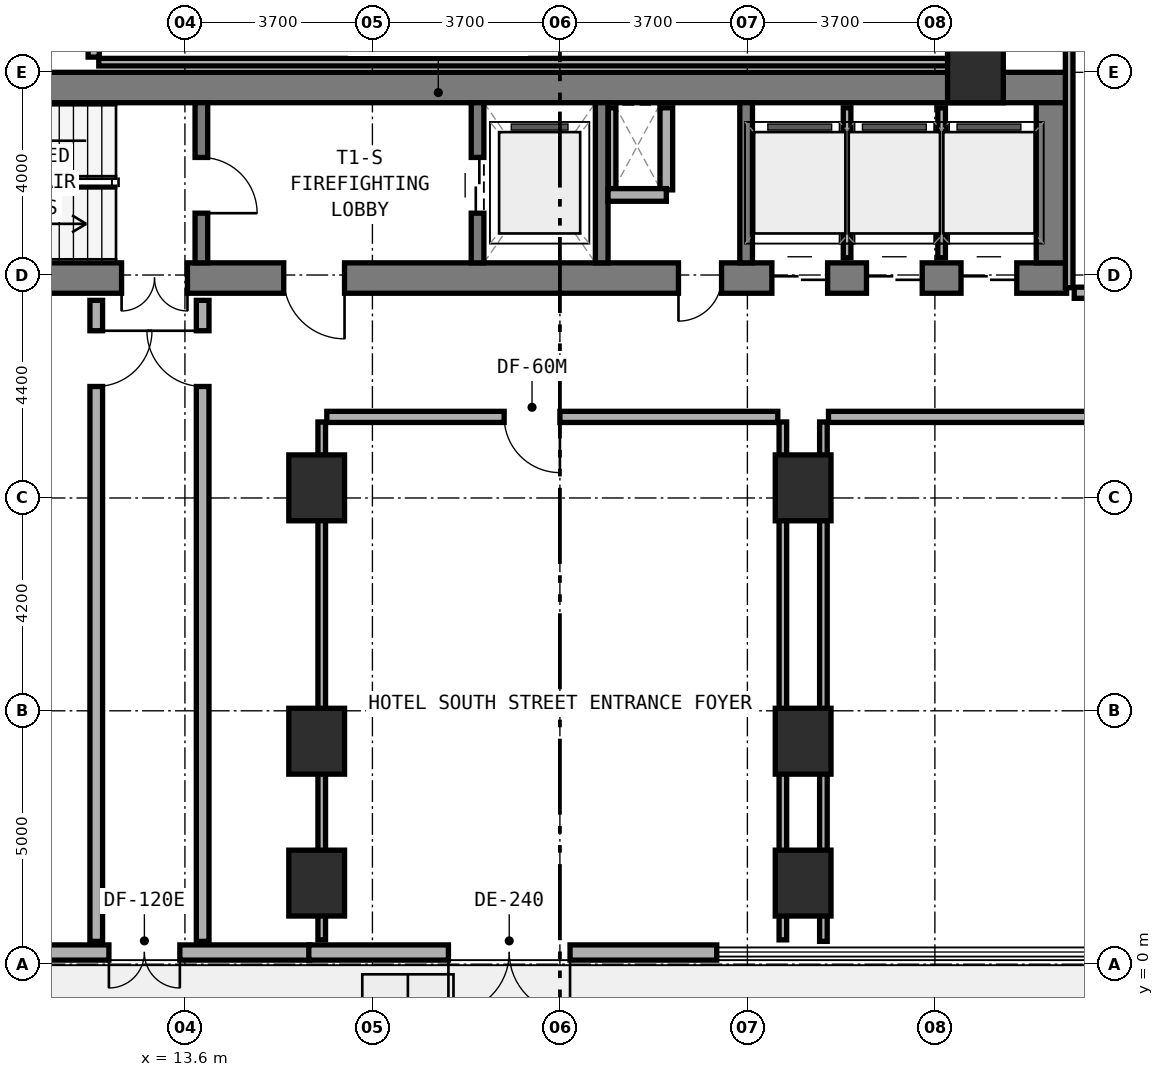
"""IFC4 building model, lengths in metres.
Left out: names, types, materials, properties, quantities, classifications, styles, units other than length and angle.
Written with IfcOpenShell. Run it as: python <this file> out.ifc"""

import sys

from ifc_helpers import new_model, si_unit, direction, frame, frame_2d, origin, origin_2d, place, context, subcontext, project, spatial, rectangle, extrude, element, fill, save


model = new_model("IFC4")
c1 = context("Model", 3, precision=1e-05, world=origin(), true_north=direction((0.0, 1.0)))
c2 = subcontext(c1, "Body", "Model", "MODEL_VIEW")
j1 = project(units=[si_unit("LENGTHUNIT", "METRE"), si_unit("PLANEANGLEUNIT", "RADIAN")], contexts=[c1])
p1 = place(None, origin())
s1 = spatial("IfcSite", under=j1, at=p1, CompositionType="ELEMENT")
p2 = place(p1, origin())
s2 = spatial("IfcBuilding", under=s1, at=p2, CompositionType="ELEMENT")
p3 = place(p2, origin())
s3 = spatial("IfcBuildingStorey", under=s2, at=p3, CompositionType="ELEMENT", Elevation=0.0)
p4 = place(p3, frame((6.2, 13.54, 0.0), z_axis=(0.0, 0.0, 1.0), x_axis=(1.0, 0.0, 0.0)))
e1 = element("IfcWall", 1, at=p4, inside=s3, PredefinedType="SHEAR", context=c2, shape_type="SweptSolid", body=[
    extrude(rectangle(XDim=24.8, YDim=0.6, at=frame_2d((12.4, 0.0))), origin(), (0.0, 0.0, 1.0), 5.4),
])
p5 = place(p4, frame((9.35, 0.0, 0.0)))
e2 = element("IfcOpeningElement", 2, at=p5, cuts=e1, PredefinedType="OPENING", context=c2, shape_type="SweptSolid", body=[
    extrude(rectangle(XDim=1.2, YDim=2.15, at=frame_2d((0.6, 1.075))), frame((0.0, 0.31, 0.0), z_axis=(0.0, -1.0, 0.0), x_axis=(1.0, 0.0, 0.0)), (0.0, 0.0, 1.0), 0.62),
])
p6 = place(p4, frame((6.15, 0.0, 0.0)))
e3 = element("IfcOpeningElement", 3, at=p6, cuts=e1, PredefinedType="OPENING", context=c2, shape_type="SweptSolid", body=[
    extrude(rectangle(XDim=1.3, YDim=2.15, at=frame_2d((0.65, 1.075))), frame((0.0, 0.31, 0.0), z_axis=(0.0, -1.0, 0.0), x_axis=(1.0, 0.0, 0.0)), (0.0, 0.0, 1.0), 0.62),
])
p7 = place(p4, frame((17.14, 0.0, 0.0)))
e4 = element("IfcOpeningElement", 4, at=p7, cuts=e1, PredefinedType="OPENING", context=c2, shape_type="SweptSolid", body=[
    extrude(rectangle(XDim=0.85, YDim=2.1, at=frame_2d((0.425, 1.05))), frame((0.0, 0.31, 0.0), z_axis=(0.0, -1.0, 0.0), x_axis=(1.0, 0.0, 0.0)), (0.0, 0.0, 1.0), 0.62),
])
p8 = place(p4, frame((18.983, 0.0, 0.0)))
e5 = element("IfcOpeningElement", 5, at=p8, cuts=e1, PredefinedType="OPENING", context=c2, shape_type="SweptSolid", body=[
    extrude(rectangle(XDim=1.1, YDim=2.15, at=frame_2d((0.55, 1.075))), frame((0.0, 0.31, 0.0), z_axis=(0.0, -1.0, 0.0), x_axis=(1.0, 0.0, 0.0)), (0.0, 0.0, 1.0), 0.62),
])
p9 = place(p4, frame((20.85, 0.0, 0.0)))
e6 = element("IfcOpeningElement", 6, at=p9, cuts=e1, PredefinedType="OPENING", context=c2, shape_type="SweptSolid", body=[
    extrude(rectangle(XDim=1.1, YDim=2.15, at=frame_2d((0.55, 1.075))), frame((0.0, 0.31, 0.0), z_axis=(0.0, -1.0, 0.0), x_axis=(1.0, 0.0, 0.0)), (0.0, 0.0, 1.0), 0.62),
])
p10 = place(p4, frame((22.716, 0.0, 0.0)))
e7 = element("IfcOpeningElement", 7, at=p10, cuts=e1, PredefinedType="OPENING", context=c2, shape_type="SweptSolid", body=[
    extrude(rectangle(XDim=1.1, YDim=2.15, at=frame_2d((0.55, 1.075))), frame((0.0, 0.31, 0.0), z_axis=(0.0, -1.0, 0.0), x_axis=(1.0, 0.0, 0.0)), (0.0, 0.0, 1.0), 0.62),
])
p11 = place(p3, frame((6.2, 17.3, 0.0), z_axis=(0.0, 0.0, 1.0), x_axis=(1.0, 0.0, 0.0)))
e8 = element("IfcWall", 8, at=p11, inside=s3, PredefinedType="SHEAR", context=c2, shape_type="SweptSolid", body=[
    extrude(rectangle(XDim=24.8, YDim=0.6, at=frame_2d((12.4, 0.0))), origin(), (0.0, 0.0, 1.0), 5.4),
])
p12 = place(p3, frame((30.7, 13.84, 0.0), z_axis=(0.0, 0.0, 1.0), x_axis=(0.0, 1.0, 0.0)))
e9 = element("IfcWall", 9, at=p12, inside=s3, PredefinedType="SHEAR", context=c2, shape_type="SweptSolid", body=[
    extrude(rectangle(XDim=3.16, YDim=0.6, at=frame_2d((1.58, 0.0))), origin(), (0.0, 0.0, 1.0), 5.4),
])
p13 = place(p3, frame((13.925, 13.84, 0.0), z_axis=(0.0, 0.0, 1.0), x_axis=(0.0, 1.0, 0.0)))
e10 = element("IfcWall", 10, at=p13, inside=s3, PredefinedType="STANDARD", context=c2, shape_type="SweptSolid", body=[
    extrude(rectangle(XDim=3.16, YDim=0.25, at=frame_2d((1.58, 0.0))), origin(), (0.0, 0.0, 1.0), 5.05),
])
p14 = place(p13, frame((0.98, 0.0, 0.0)))
e11 = element("IfcOpeningElement", 11, at=p14, cuts=e10, PredefinedType="OPENING", context=c2, shape_type="SweptSolid", body=[
    extrude(rectangle(XDim=1.1, YDim=2.15, at=frame_2d((0.55, 1.075))), frame((0.0, 0.135, 0.0), z_axis=(0.0, -1.0, 0.0), x_axis=(1.0, 0.0, 0.0)), (0.0, 0.0, 1.0), 0.27),
])
p15 = place(p3, frame((19.375, 13.84, 0.0), z_axis=(0.0, 0.0, 1.0), x_axis=(0.0, 1.0, 0.0)))
e12 = element("IfcWall", 12, at=p15, inside=s3, PredefinedType="STANDARD", context=c2, shape_type="SweptSolid", body=[
    extrude(rectangle(XDim=3.16, YDim=0.25, at=frame_2d((1.58, 0.0))), origin(), (0.0, 0.0, 1.0), 5.05),
])
p16 = place(p15, frame((0.98, 0.0, 0.0)))
e13 = element("IfcOpeningElement", 13, at=p16, cuts=e12, PredefinedType="OPENING", context=c2, shape_type="SweptSolid", body=[
    extrude(rectangle(XDim=1.1, YDim=2.15, at=frame_2d((0.55, 1.075))), frame((0.0, 0.135, 0.0), z_axis=(0.0, -1.0, 0.0), x_axis=(1.0, 0.0, 0.0)), (0.0, 0.0, 1.0), 0.27),
])
for number, where, z_axis, x_axis in (
    (14, (21.825, 13.84, 0.0), (0.0, 0.0, 1.0), (0.0, 1.0, 0.0)),
    (15, (24.675, 13.84, 0.0), (0.0, 0.0, 1.0), (0.0, 1.0, 0.0)),
):
    element("IfcWall", number, at=place(p3, frame(where, z_axis=z_axis, x_axis=x_axis)), inside=s3, PredefinedType="STANDARD", context=c2, shape_type="SweptSolid", body=[
        extrude(rectangle(XDim=3.16, YDim=0.25, at=frame_2d((1.58, 0.0))), origin(), (0.0, 0.0, 1.0), 5.05),
    ])
for number, where, z_axis, x_axis in (
    (16, (16.2, 9.4, 0.0), (0.0, 0.0, 1.0), (1.0, 0.0, 0.0)),
    (17, (25.8, 9.4, 0.0), (0.0, 0.0, 1.0), (1.0, 0.0, 0.0)),
    (18, (29.2, 17.65, 0.0), (0.0, 0.0, 1.0), (1.0, 0.0, 0.0)),
    (19, (16.2, 1.6, 0.0), (0.0, 0.0, 1.0), (1.0, 0.0, 0.0)),
    (20, (25.8, 1.6, 0.0), (0.0, 0.0, 1.0), (1.0, 0.0, 0.0)),
    (21, (16.2, 4.4, 0.0), (0.0, 0.0, 1.0), (1.0, 0.0, 0.0)),
    (22, (25.8, 4.4, 0.0), (0.0, 0.0, 1.0), (1.0, 0.0, 0.0)),
):
    element("IfcColumn", number, at=place(p3, frame(where, z_axis=z_axis, x_axis=x_axis)), inside=s3, PredefinedType="COLUMN", context=c2, shape_type="SweptSolid", body=[
        extrude(rectangle(XDim=1.1, YDim=1.3, at=origin_2d()), origin(), (0.0, 0.0, 1.0), 5.4),
    ])
p17 = place(p3, frame((8.059, 0.23, 0.0), z_axis=(0.0, 0.0, 1.0), x_axis=(1.0, 0.0, 0.0)))
e23 = element("IfcWall", 23, at=p17, inside=s3, PredefinedType="STANDARD", context=c2, shape_type="SweptSolid", body=[
    extrude(rectangle(XDim=8.002, YDim=0.3, at=frame_2d((4.001, 0.0))), origin(), (0.0, 0.0, 1.0), 5.05),
])
p18 = place(p17, frame((4.041, 0.0, 0.0)))
e24 = element("IfcOpeningElement", 24, at=p18, cuts=e23, PredefinedType="OPENING", context=c2, shape_type="SweptSolid", body=[
    extrude(rectangle(XDim=1.4, YDim=2.2, at=frame_2d((0.7, 1.1))), frame((0.0, 0.16, 0.0), z_axis=(0.0, -1.0, 0.0), x_axis=(1.0, 0.0, 0.0)), (0.0, 0.0, 1.0), 0.32),
])
p19 = place(p3, frame((16.045, 0.23, 0.0), z_axis=(0.0, 0.0, 1.0), x_axis=(1.0, 0.0, 0.0)))
e25 = element("IfcWall", 25, at=p19, inside=s3, PredefinedType="STANDARD", context=c2, shape_type="SweptSolid", body=[
    extrude(rectangle(XDim=8.05, YDim=0.3, at=frame_2d((4.025, 0.0))), origin(), (0.0, 0.0, 1.0), 5.05),
])
p20 = place(p19, frame((2.755, 0.0, 0.0)))
e26 = element("IfcOpeningElement", 26, at=p20, cuts=e25, PredefinedType="OPENING", context=c2, shape_type="SweptSolid", body=[
    extrude(rectangle(XDim=2.4, YDim=2.6, at=frame_2d((1.2, 1.3))), frame((0.0, 0.16, 0.0), z_axis=(0.0, -1.0, 0.0), x_axis=(1.0, 0.0, 0.0)), (0.0, 0.0, 1.0), 0.32),
])
p21 = place(p3, frame((22.03, 15.28, 0.0), z_axis=(0.0, 0.0, 1.0), x_axis=(0.0, 1.0, 0.0)))
e27 = element("IfcWall", 27, at=p21, inside=s3, PredefinedType="PARTITIONING", context=c2, shape_type="SweptSolid", body=[
    extrude(rectangle(XDim=1.62, YDim=0.15, at=frame_2d((0.81, 0.0))), origin(), (0.0, 0.0, 1.0), 5.05),
])
p22 = place(p3, frame((23.1, 15.28, 0.0), z_axis=(0.0, 0.0, 1.0), x_axis=(0.0, 1.0, 0.0)))
e28 = element("IfcWall", 28, at=p22, inside=s3, PredefinedType="SOLIDWALL", context=c2, shape_type="SweptSolid", body=[
    extrude(rectangle(XDim=1.62, YDim=0.25, at=frame_2d((0.81, 0.0))), origin(), (0.0, 0.0, 1.0), 5.05),
])
p23 = place(p3, frame((21.95, 15.18, 0.0), z_axis=(0.0, 0.0, 1.0), x_axis=(1.0, 0.0, 0.0)))
e29 = element("IfcWall", 29, at=p23, inside=s3, PredefinedType="SOLIDWALL", context=c2, shape_type="SweptSolid", body=[
    extrude(rectangle(XDim=1.15, YDim=0.25, at=frame_2d((0.575, 0.0))), origin(), (0.0, 0.0, 1.0), 5.05),
])
p24 = place(p3, frame((26.667, 13.94, 0.0), z_axis=(0.0, 0.0, 1.0), x_axis=(0.0, 1.0, 0.0)))
e30 = element("IfcWall", 30, at=p24, inside=s3, PredefinedType="PARTITIONING", context=c2, shape_type="SweptSolid", body=[
    extrude(rectangle(XDim=2.96, YDim=0.15, at=frame_2d((1.48, 0.0))), origin(), (0.0, 0.0, 1.0), 5.05),
])
p25 = place(p3, frame((28.533, 13.94, 0.0), z_axis=(0.0, 0.0, 1.0), x_axis=(0.0, 1.0, 0.0)))
e31 = element("IfcWall", 31, at=p25, inside=s3, PredefinedType="PARTITIONING", context=c2, shape_type="SweptSolid", body=[
    extrude(rectangle(XDim=2.96, YDim=0.15, at=frame_2d((1.48, 0.0))), origin(), (0.0, 0.0, 1.0), 4.125),
])
p26 = place(p3, frame((11.85, 0.45, 0.0), z_axis=(0.0, 0.0, 1.0), x_axis=(0.0, 1.0, 0.0)))
e32 = element("IfcWall", 32, at=p26, inside=s3, PredefinedType="SOLIDWALL", context=c2, shape_type="SweptSolid", body=[
    extrude(rectangle(XDim=12.65, YDim=0.25, at=frame_2d((6.325, 0.0))), origin(), (0.0, 0.0, 1.0), 4.225),
])
p27 = place(p26, frame((10.95, 0.0, 0.0)))
e33 = element("IfcOpeningElement", 33, at=p27, cuts=e32, PredefinedType="OPENING", context=c2, shape_type="SweptSolid", body=[
    extrude(rectangle(XDim=1.1, YDim=2.15, at=frame_2d((0.55, 1.075))), frame((0.0, 0.135, 0.0), z_axis=(0.0, -1.0, 0.0), x_axis=(1.0, 0.0, 0.0)), (0.0, 0.0, 1.0), 0.27),
])
p28 = place(p3, frame((13.95, 0.45, 0.0), z_axis=(0.0, 0.0, 1.0), x_axis=(0.0, 1.0, 0.0)))
e34 = element("IfcWall", 34, at=p28, inside=s3, PredefinedType="SOLIDWALL", context=c2, shape_type="SweptSolid", body=[
    extrude(rectangle(XDim=12.65, YDim=0.25, at=frame_2d((6.325, 0.0))), origin(), (0.0, 0.0, 1.0), 4.225),
])
p29 = place(p28, frame((10.95, 0.0, 0.0)))
e35 = element("IfcOpeningElement", 35, at=p29, cuts=e34, PredefinedType="OPENING", context=c2, shape_type="SweptSolid", body=[
    extrude(rectangle(XDim=1.1, YDim=2.15, at=frame_2d((0.55, 1.075))), frame((0.0, 0.135, 0.0), z_axis=(0.0, -1.0, 0.0), x_axis=(1.0, 0.0, 0.0)), (0.0, 0.0, 1.0), 0.27),
])
p30 = place(p3, frame((29.0, 17.9, 0.0), z_axis=(0.0, 0.0, 1.0), x_axis=(0.0, 1.0, 0.0)))
e36 = element("IfcWall", 36, at=p30, inside=s3, PredefinedType="PARTITIONING", context=c2, shape_type="SweptSolid", body=[
    extrude(rectangle(XDim=14.2, YDim=0.15, at=frame_2d((7.1, 0.0))), origin(), (0.0, 0.0, 1.0), 4.025),
])
p31 = place(p3, frame((11.9, 17.8, 0.0), z_axis=(0.0, 0.0, 1.0), x_axis=(1.0, 0.0, 0.0)))
e37 = element("IfcWall", 37, at=p31, inside=s3, PredefinedType="PARTITIONING", context=c2, shape_type="SweptSolid", body=[
    extrude(rectangle(XDim=17.0, YDim=0.15, at=frame_2d((8.5, 0.0))), origin(), (0.0, 0.0, 1.0), 5.05),
])
p32 = place(p3, frame((11.8, 17.9, 0.0), z_axis=(0.0, 0.0, 1.0), x_axis=(0.0, 1.0, 0.0)))
e38 = element("IfcWall", 38, at=p32, inside=s3, PredefinedType="SOLIDWALL", context=c2, shape_type="SweptSolid", body=[
    extrude(rectangle(XDim=14.2, YDim=0.22, at=frame_2d((7.1, 0.0))), origin(), (0.0, 0.0, 1.0), 4.125),
])
p33 = place(p32, frame((5.885, 0.0, 0.0)))
e39 = element("IfcOpeningElement", 39, at=p33, cuts=e38, PredefinedType="OPENING", context=c2, shape_type="SweptSolid", body=[
    extrude(rectangle(XDim=1.1, YDim=2.1, at=frame_2d((0.55, 1.05))), frame((0.0, 0.12, 0.0), z_axis=(0.0, -1.0, 0.0), x_axis=(1.0, 0.0, 0.0)), (0.0, 0.0, 1.0), 0.24),
])
p34 = place(p3, frame((31.05, 13.35, 0.0), z_axis=(0.0, 0.0, 1.0), x_axis=(0.0, 1.0, 0.0)))
e40 = element("IfcWall", 40, at=p34, inside=s3, PredefinedType="PARTITIONING", context=c2, shape_type="SweptSolid", body=[
    extrude(rectangle(XDim=18.75, YDim=0.15, at=frame_2d((9.375, 0.0))), origin(), (0.0, 0.0, 1.0), 4.025),
])
p35 = place(p3, frame((31.15, 13.25, 0.0), z_axis=(0.0, 0.0, 1.0), x_axis=(1.0, 0.0, 0.0)))
e41 = element("IfcWall", 41, at=p35, inside=s3, PredefinedType="SOLIDWALL", context=c2, shape_type="SweptSolid", body=[
    extrude(rectangle(XDim=9.75, YDim=0.22, at=frame_2d((4.875, 0.0))), origin(), (0.0, 0.0, 1.0), 4.575),
])
p36 = place(p35, frame((3.882, 0.0, 0.0)))
e42 = element("IfcOpeningElement", 42, at=p36, cuts=e41, PredefinedType="OPENING", context=c2, shape_type="SweptSolid", body=[
    extrude(rectangle(XDim=1.1, YDim=2.1, at=frame_2d((0.55, 1.05))), frame((0.0, 0.12, 0.0), z_axis=(0.0, -1.0, 0.0), x_axis=(1.0, 0.0, 0.0)), (0.0, 0.0, 1.0), 0.24),
])
for number, where, z_axis, x_axis in (
    (43, (16.3, 0.48, 0.0), (0.0, 0.0, 1.0), (0.0, 1.0, 0.0)),
    (44, (25.4, 0.48, 0.0), (0.0, 0.0, 1.0), (0.0, 1.0, 0.0)),
):
    element("IfcWall", number, at=place(p3, frame(where, z_axis=z_axis, x_axis=x_axis)), inside=s3, PredefinedType="PARTITIONING", context=c2, shape_type="SweptSolid", body=[
        extrude(rectangle(XDim=10.22, YDim=0.15, at=frame_2d((5.11, 0.0))), origin(), (0.0, 0.0, 1.0), 4.425),
    ])
p37 = place(p3, frame((16.4, 10.8, 0.0), z_axis=(0.0, 0.0, 1.0), x_axis=(1.0, 0.0, 0.0)))
e45 = element("IfcWall", 45, at=p37, inside=s3, PredefinedType="SOLIDWALL", context=c2, shape_type="SweptSolid", body=[
    extrude(rectangle(XDim=8.9, YDim=0.22, at=frame_2d((4.45, 0.0))), origin(), (0.0, 0.0, 1.0), 5.05),
])
p38 = place(p37, frame((3.5, 0.0, 0.0)))
e46 = element("IfcOpeningElement", 46, at=p38, cuts=e45, PredefinedType="OPENING", context=c2, shape_type="SweptSolid", body=[
    extrude(rectangle(XDim=1.1, YDim=2.1, at=frame_2d((0.55, 1.05))), frame((0.0, 0.12, 0.0), z_axis=(0.0, -1.0, 0.0), x_axis=(1.0, 0.0, 0.0)), (0.0, 0.0, 1.0), 0.24),
])
p39 = place(p3, frame((26.2, 0.45, 0.0), z_axis=(0.0, 0.0, 1.0), x_axis=(0.0, 1.0, 0.0)))
e47 = element("IfcWall", 47, at=p39, inside=s3, PredefinedType="PARTITIONING", context=c2, shape_type="SweptSolid", body=[
    extrude(rectangle(XDim=10.25, YDim=0.15, at=frame_2d((5.125, 0.0))), origin(), (0.0, 0.0, 1.0), 4.125),
])
p40 = place(p3, frame((26.3, 10.8, 0.0), z_axis=(0.0, 0.0, 1.0), x_axis=(1.0, 0.0, 0.0)))
e48 = element("IfcWall", 48, at=p40, inside=s3, PredefinedType="SOLIDWALL", context=c2, shape_type="SweptSolid", body=[
    extrude(rectangle(XDim=14.8, YDim=0.22, at=frame_2d((7.4, 0.0))), origin(), (0.0, 0.0, 1.0), 4.125),
])
p41 = place(p40, frame((5.875, 0.0, 0.0)))
e49 = element("IfcOpeningElement", 49, at=p41, cuts=e48, PredefinedType="OPENING", context=c2, shape_type="SweptSolid", body=[
    extrude(rectangle(XDim=1.1, YDim=2.1, at=frame_2d((0.55, 1.05))), frame((0.0, 0.12, 0.0), z_axis=(0.0, -1.0, 0.0), x_axis=(1.0, 0.0, 0.0)), (0.0, 0.0, 1.0), 0.24),
])
p42 = place(p18, frame((1.4, 0.0, 0.0), z_axis=(0.0, 0.0, 1.0), x_axis=(-1.0, 0.0, 0.0)))
e50 = element("IfcDoor", 50, at=p42, inside=s3, OperationType="DOUBLE_DOOR_SINGLE_SWING", PredefinedType="DOOR", context=c2, shape_type="SweptSolid", body=[
    extrude(rectangle(XDim=1.4, YDim=2.2, at=frame_2d((0.7, 1.1))), frame((0.0, 0.025, 0.0), z_axis=(0.0, -1.0, 0.0), x_axis=(1.0, 0.0, 0.0)), (0.0, 0.0, 1.0), 0.05),
])
fill(e24, e50)
p43 = place(p20, frame((2.4, 0.0, 0.0), z_axis=(0.0, 0.0, 1.0), x_axis=(-1.0, 0.0, 0.0)))
e51 = element("IfcDoor", 51, at=p43, inside=s3, OperationType="DOUBLE_DOOR_SINGLE_SWING", PredefinedType="DOOR", context=c2, shape_type="SweptSolid", body=[
    extrude(rectangle(XDim=2.4, YDim=2.6, at=frame_2d((1.2, 1.3))), frame((0.0, 0.025, 0.0), z_axis=(0.0, -1.0, 0.0), x_axis=(1.0, 0.0, 0.0)), (0.0, 0.0, 1.0), 0.05),
])
fill(e26, e51)
p44 = place(p14, frame((1.1, 0.0, 0.0), z_axis=(0.0, 0.0, 1.0), x_axis=(-1.0, 0.0, 0.0)))
e52 = element("IfcDoor", 52, at=p44, inside=s3, OperationType="SINGLE_SWING_RIGHT", PredefinedType="DOOR", context=c2, shape_type="SweptSolid", body=[
    extrude(rectangle(XDim=1.1, YDim=2.15, at=frame_2d((0.55, 1.075))), frame((0.0, 0.025, 0.0), z_axis=(0.0, -1.0, 0.0), x_axis=(1.0, 0.0, 0.0)), (0.0, 0.0, 1.0), 0.05),
])
fill(e11, e52)
p45 = place(p5, frame((1.2, 0.0, 0.0), z_axis=(0.0, 0.0, 1.0), x_axis=(-1.0, 0.0, 0.0)))
e53 = element("IfcDoor", 53, at=p45, inside=s3, OperationType="SINGLE_SWING_LEFT", PredefinedType="DOOR", context=c2, shape_type="SweptSolid", body=[
    extrude(rectangle(XDim=1.2, YDim=2.15, at=frame_2d((0.6, 1.075))), frame((0.0, 0.025, 0.0), z_axis=(0.0, -1.0, 0.0), x_axis=(1.0, 0.0, 0.0)), (0.0, 0.0, 1.0), 0.05),
])
fill(e2, e53)
p46 = place(p6, frame((1.3, 0.0, 0.0), z_axis=(0.0, 0.0, 1.0), x_axis=(-1.0, 0.0, 0.0)))
e54 = element("IfcDoor", 54, at=p46, inside=s3, OperationType="DOUBLE_DOOR_SINGLE_SWING", PredefinedType="DOOR", context=c2, shape_type="SweptSolid", body=[
    extrude(rectangle(XDim=1.3, YDim=2.15, at=frame_2d((0.65, 1.075))), frame((0.0, 0.025, 0.0), z_axis=(0.0, -1.0, 0.0), x_axis=(1.0, 0.0, 0.0)), (0.0, 0.0, 1.0), 0.05),
])
fill(e3, e54)
p47 = place(p16, origin())
e55 = element("IfcDoor", 55, at=p47, inside=s3, OperationType="DOUBLE_DOOR_SLIDING", PredefinedType="DOOR", context=c2, shape_type="SweptSolid", body=[
    extrude(rectangle(XDim=1.1, YDim=2.15, at=frame_2d((0.55, 1.075))), frame((0.0, 0.025, 0.0), z_axis=(0.0, -1.0, 0.0), x_axis=(1.0, 0.0, 0.0)), (0.0, 0.0, 1.0), 0.05),
])
fill(e13, e55)
p48 = place(p7, frame((0.85, 0.0, 0.0), z_axis=(0.0, 0.0, 1.0), x_axis=(-1.0, 0.0, 0.0)))
e56 = element("IfcDoor", 56, at=p48, inside=s3, OperationType="SINGLE_SWING_RIGHT", PredefinedType="DOOR", context=c2, shape_type="SweptSolid", body=[
    extrude(rectangle(XDim=0.85, YDim=2.1, at=frame_2d((0.425, 1.05))), frame((0.0, 0.025, 0.0), z_axis=(0.0, -1.0, 0.0), x_axis=(1.0, 0.0, 0.0)), (0.0, 0.0, 1.0), 0.05),
])
fill(e4, e56)
p49 = place(p8, frame((1.1, 0.0, 0.0), z_axis=(0.0, 0.0, 1.0), x_axis=(-1.0, 0.0, 0.0)))
e57 = element("IfcDoor", 57, at=p49, inside=s3, OperationType="DOUBLE_DOOR_SLIDING", PredefinedType="DOOR", context=c2, shape_type="SweptSolid", body=[
    extrude(rectangle(XDim=1.1, YDim=2.15, at=frame_2d((0.55, 1.075))), frame((0.0, 0.025, 0.0), z_axis=(0.0, -1.0, 0.0), x_axis=(1.0, 0.0, 0.0)), (0.0, 0.0, 1.0), 0.05),
])
fill(e5, e57)
p50 = place(p9, frame((1.1, 0.0, 0.0), z_axis=(0.0, 0.0, 1.0), x_axis=(-1.0, 0.0, 0.0)))
e58 = element("IfcDoor", 58, at=p50, inside=s3, OperationType="DOUBLE_DOOR_SLIDING", PredefinedType="DOOR", context=c2, shape_type="SweptSolid", body=[
    extrude(rectangle(XDim=1.1, YDim=2.15, at=frame_2d((0.55, 1.075))), frame((0.0, 0.025, 0.0), z_axis=(0.0, -1.0, 0.0), x_axis=(1.0, 0.0, 0.0)), (0.0, 0.0, 1.0), 0.05),
])
fill(e6, e58)
p51 = place(p10, frame((1.1, 0.0, 0.0), z_axis=(0.0, 0.0, 1.0), x_axis=(-1.0, 0.0, 0.0)))
e59 = element("IfcDoor", 59, at=p51, inside=s3, OperationType="DOUBLE_DOOR_SLIDING", PredefinedType="DOOR", context=c2, shape_type="SweptSolid", body=[
    extrude(rectangle(XDim=1.1, YDim=2.15, at=frame_2d((0.55, 1.075))), frame((0.0, 0.025, 0.0), z_axis=(0.0, -1.0, 0.0), x_axis=(1.0, 0.0, 0.0)), (0.0, 0.0, 1.0), 0.05),
])
fill(e7, e59)
p52 = place(p27, frame((1.1, 0.0, 0.0), z_axis=(0.0, 0.0, 1.0), x_axis=(-1.0, 0.0, 0.0)))
e60 = element("IfcDoor", 60, at=p52, inside=s3, OperationType="SINGLE_SWING_LEFT", PredefinedType="DOOR", context=c2, shape_type="SweptSolid", body=[
    extrude(rectangle(XDim=1.1, YDim=2.15, at=frame_2d((0.55, 1.075))), frame((0.0, 0.025, 0.0), z_axis=(0.0, -1.0, 0.0), x_axis=(1.0, 0.0, 0.0)), (0.0, 0.0, 1.0), 0.05),
])
fill(e33, e60)
p53 = place(p29, origin())
e61 = element("IfcDoor", 61, at=p53, inside=s3, OperationType="SINGLE_SWING_RIGHT", PredefinedType="DOOR", context=c2, shape_type="SweptSolid", body=[
    extrude(rectangle(XDim=1.1, YDim=2.15, at=frame_2d((0.55, 1.075))), frame((0.0, 0.025, 0.0), z_axis=(0.0, -1.0, 0.0), x_axis=(1.0, 0.0, 0.0)), (0.0, 0.0, 1.0), 0.05),
])
fill(e35, e61)
p54 = place(p38, frame((1.1, 0.0, 0.0), z_axis=(0.0, 0.0, 1.0), x_axis=(-1.0, 0.0, 0.0)))
e62 = element("IfcDoor", 62, at=p54, inside=s3, OperationType="SINGLE_SWING_LEFT", PredefinedType="DOOR", context=c2, shape_type="SweptSolid", body=[
    extrude(rectangle(XDim=1.1, YDim=2.1, at=frame_2d((0.55, 1.05))), frame((0.0, 0.025, 0.0), z_axis=(0.0, -1.0, 0.0), x_axis=(1.0, 0.0, 0.0)), (0.0, 0.0, 1.0), 0.05),
])
fill(e46, e62)
save(model, sys.argv[1])
